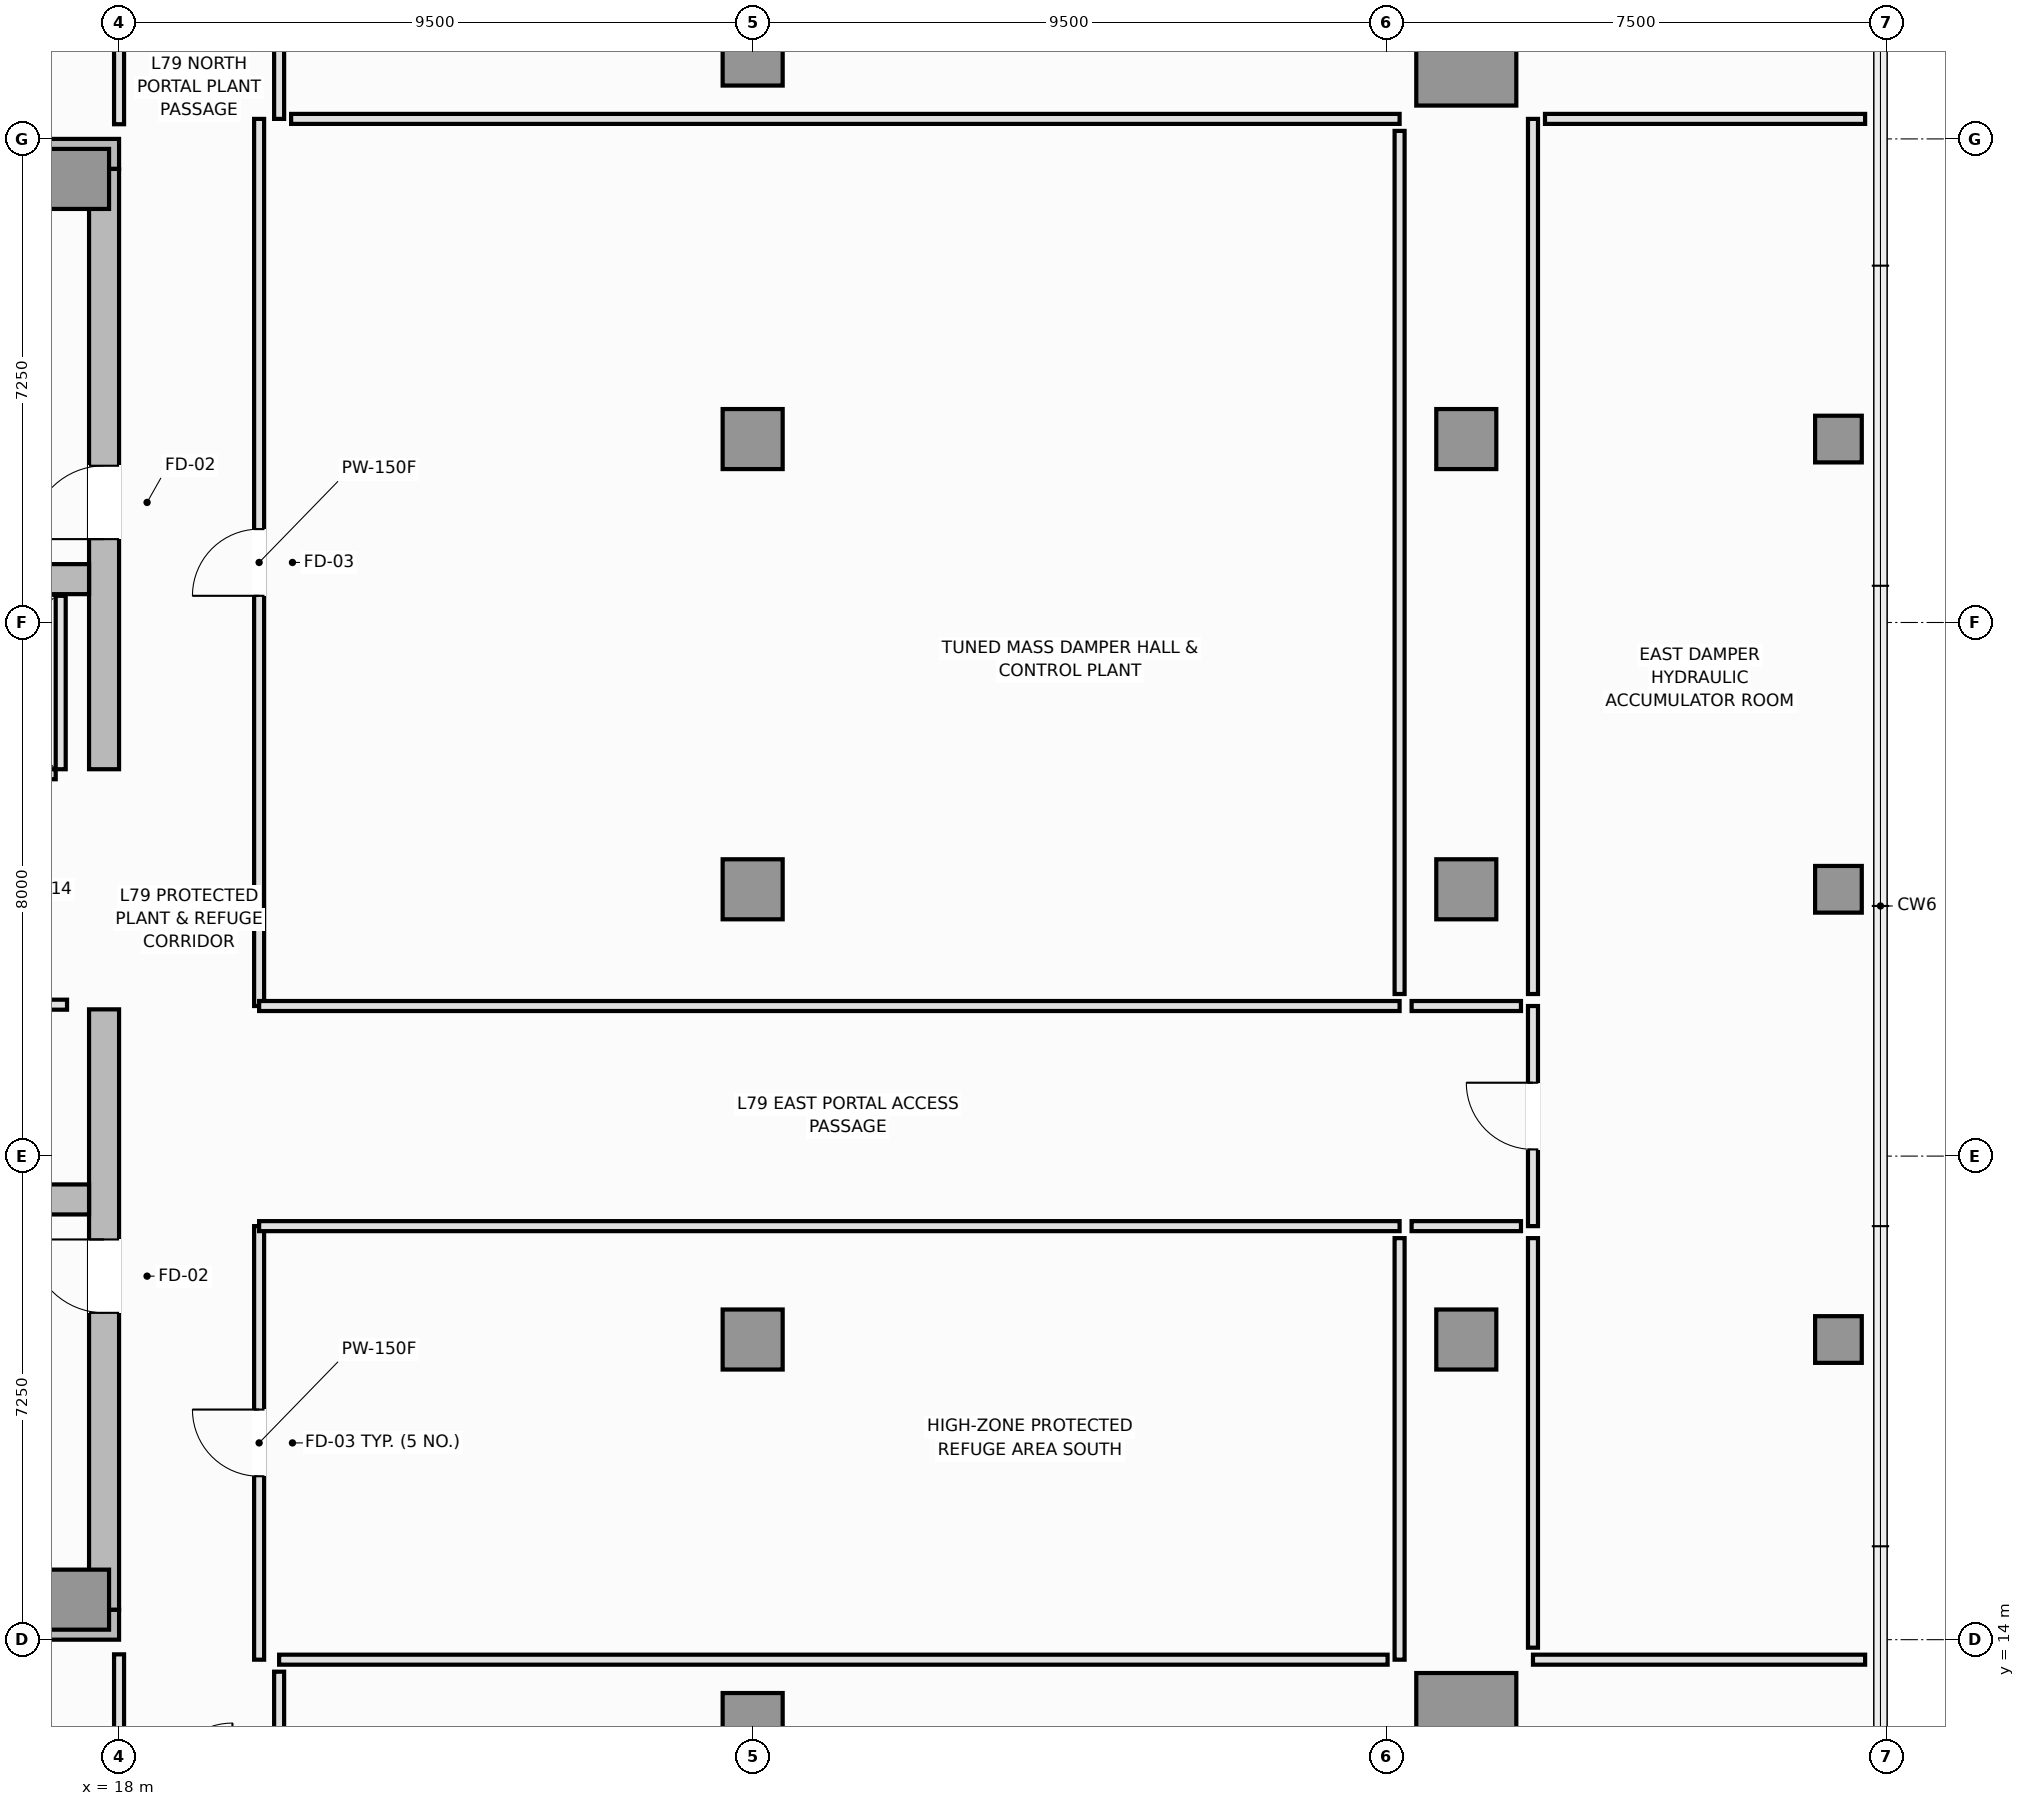
"""IFC4 building model, lengths in metres.
Left out: names, types, materials, properties, quantities, classifications, styles, units other than length and angle.
Written with IfcOpenShell. Run it as: python <this file> out.ifc"""

import sys

from ifc_helpers import new_model, si_unit, direction, frame, frame_2d, origin, origin_2d, place, context, subcontext, project, spatial, rectangle, extrude, element, fill, save


model = new_model("IFC4")
c1 = context("Model", 3, precision=1e-05, world=origin(), true_north=direction((0.0, 1.0)))
c2 = subcontext(c1, "Body", "Model", "MODEL_VIEW")
j1 = project(units=[si_unit("LENGTHUNIT", "METRE"), si_unit("PLANEANGLEUNIT", "RADIAN")], contexts=[c1])
p1 = place(None, origin())
s1 = spatial("IfcSite", under=j1, at=p1, CompositionType="ELEMENT")
p2 = place(p1, origin())
s2 = spatial("IfcBuilding", under=s1, at=p2, CompositionType="ELEMENT")
p3 = place(p2, frame((0.0, 0.0, 296.65)))
s3 = spatial("IfcBuildingStorey", under=s2, at=p3, CompositionType="ELEMENT", Elevation=296.65)
for number, where, z_axis, x_axis in (
    (1, (4.5, 14.225, 0.0), (0.0, 0.0, 1.0), (1.0, 0.0, 0.0)),
    (2, (4.5, 36.275, 0.0), (0.0, 0.0, 1.0), (1.0, 0.0, 0.0)),
):
    element("IfcWall", number, at=place(p3, frame(where, z_axis=z_axis, x_axis=x_axis)), inside=s3, PredefinedType="SHEAR", context=c2, shape_type="SweptSolid", body=[
        extrude(rectangle(XDim=13.5, YDim=0.45, at=frame_2d((6.75, 0.0))), origin(), (0.0, 0.0, 1.0), 6.4),
    ])
p4 = place(p3, frame((17.775, 14.45, 0.0), z_axis=(0.0, 0.0, 1.0), x_axis=(0.0, 1.0, 0.0)))
e3 = element("IfcWall", 3, at=p4, inside=s3, PredefinedType="SHEAR", context=c2, shape_type="SweptSolid", body=[
    extrude(rectangle(XDim=9.0, YDim=0.45, at=frame_2d((4.5, 0.0))), origin(), (0.0, 0.0, 1.0), 6.4),
])
p5 = place(p4, frame((4.45, 0.0, 0.0)))
e4 = element("IfcOpeningElement", 4, at=p5, cuts=e3, PredefinedType="OPENING", context=c2, shape_type="SweptSolid", body=[
    extrude(rectangle(XDim=1.1, YDim=2.15, at=frame_2d((0.55, 1.075))), frame((0.0, 0.235, 0.0), z_axis=(0.0, -1.0, 0.0), x_axis=(1.0, 0.0, 0.0)), (0.0, 0.0, 1.0), 0.47),
])
p6 = place(p3, frame((17.775, 27.05, 0.0), z_axis=(0.0, 0.0, 1.0), x_axis=(0.0, 1.0, 0.0)))
e5 = element("IfcWall", 5, at=p6, inside=s3, PredefinedType="SHEAR", context=c2, shape_type="SweptSolid", body=[
    extrude(rectangle(XDim=9.0, YDim=0.45, at=frame_2d((4.5, 0.0))), origin(), (0.0, 0.0, 1.0), 6.4),
])
p7 = place(p6, frame((3.45, 0.0, 0.0)))
e6 = element("IfcOpeningElement", 6, at=p7, cuts=e5, PredefinedType="OPENING", context=c2, shape_type="SweptSolid", body=[
    extrude(rectangle(XDim=1.1, YDim=2.15, at=frame_2d((0.55, 1.075))), frame((0.0, 0.235, 0.0), z_axis=(0.0, -1.0, 0.0), x_axis=(1.0, 0.0, 0.0)), (0.0, 0.0, 1.0), 0.47),
])
for number, where, z_axis, x_axis in (
    (7, (4.95, 20.6, 0.0), (0.0, 0.0, 1.0), (1.0, 0.0, 0.0)),
    (8, (4.95, 29.9, 0.0), (0.0, 0.0, 1.0), (1.0, 0.0, 0.0)),
):
    element("IfcWall", number, at=place(p3, frame(where, z_axis=z_axis, x_axis=x_axis)), inside=s3, PredefinedType="SHEAR", context=c2, shape_type="SweptSolid", body=[
        extrude(rectangle(XDim=12.6, YDim=0.45, at=frame_2d((6.3, 0.0))), origin(), (0.0, 0.0, 1.0), 6.4),
    ])
for number, where, z_axis, x_axis in (
    (9, (17.4, 14.6, 0.0), (0.0, 0.0, 1.0), (1.0, 0.0, 0.0)),
    (10, (17.4, 35.9, 0.0), (0.0, 0.0, 1.0), (1.0, 0.0, 0.0)),
):
    element("IfcColumn", number, at=place(p3, frame(where, z_axis=z_axis, x_axis=x_axis)), inside=s3, PredefinedType="PILASTER", context=c2, shape_type="SweptSolid", body=[
        extrude(rectangle(XDim=0.9, YDim=0.9, at=origin_2d()), origin(), (0.0, 0.0, 1.0), 6.4),
    ])
for number, where, z_axis, x_axis in (
    (11, (38.2, 12.75, 0.0), (0.0, 0.0, 1.0), (1.0, 0.0, 0.0)),
    (12, (38.2, 37.75, 0.0), (0.0, 0.0, 1.0), (1.0, 0.0, 0.0)),
):
    element("IfcColumn", number, at=place(p3, frame(where, z_axis=z_axis, x_axis=x_axis)), inside=s3, PredefinedType="COLUMN", context=c2, shape_type="SweptSolid", body=[
        extrude(rectangle(XDim=1.5, YDim=1.5, at=origin_2d()), origin(), (0.0, 0.0, 1.0), 6.4),
    ])
for number, where, z_axis, x_axis in (
    (13, (27.5, 12.75, 0.0), (0.0, 0.0, 1.0), (1.0, 0.0, 0.0)),
    (14, (27.5, 37.75, 0.0), (0.0, 0.0, 1.0), (1.0, 0.0, 0.0)),
    (15, (38.2, 18.5, 0.0), (0.0, 0.0, 1.0), (1.0, 0.0, 0.0)),
    (16, (38.2, 25.25, 0.0), (0.0, 0.0, 1.0), (1.0, 0.0, 0.0)),
    (17, (38.2, 32.0, 0.0), (0.0, 0.0, 1.0), (1.0, 0.0, 0.0)),
):
    element("IfcColumn", number, at=place(p3, frame(where, z_axis=z_axis, x_axis=x_axis)), inside=s3, PredefinedType="COLUMN", context=c2, shape_type="SweptSolid", body=[
        extrude(rectangle(XDim=0.9, YDim=0.9, at=origin_2d()), origin(), (0.0, 0.0, 1.0), 6.4),
    ])
for number, where, z_axis, x_axis in (
    (18, (43.78, 18.5, 0.0), (0.0, 0.0, 1.0), (1.0, 0.0, 0.0)),
    (19, (43.78, 25.25, 0.0), (0.0, 0.0, 1.0), (1.0, 0.0, 0.0)),
    (20, (43.78, 32.0, 0.0), (0.0, 0.0, 1.0), (1.0, 0.0, 0.0)),
):
    element("IfcColumn", number, at=place(p3, frame(where, z_axis=z_axis, x_axis=x_axis)), inside=s3, PredefinedType="COLUMN", context=c2, shape_type="SweptSolid", body=[
        extrude(rectangle(XDim=0.7, YDim=0.7, at=origin_2d()), origin(), (0.0, 0.0, 1.0), 6.4),
    ])
for number, where, z_axis, x_axis in (
    (21, (27.5, 18.5, 0.0), (0.0, 0.0, 1.0), (1.0, 0.0, 0.0)),
    (22, (27.5, 25.25, 0.0), (0.0, 0.0, 1.0), (1.0, 0.0, 0.0)),
    (23, (27.5, 32.0, 0.0), (0.0, 0.0, 1.0), (1.0, 0.0, 0.0)),
):
    element("IfcColumn", number, at=place(p3, frame(where, z_axis=z_axis, x_axis=x_axis)), inside=s3, PredefinedType="COLUMN", context=c2, shape_type="SweptSolid", body=[
        extrude(rectangle(XDim=0.9, YDim=0.9, at=origin_2d()), origin(), (0.0, 0.0, 1.0), 6.4),
    ])
p8 = place(p3, frame((14.5, 26.975, 0.0), z_axis=(0.0, 0.0, 1.0), x_axis=(1.0, 0.0, 0.0)))
e24 = element("IfcWall", 24, at=p8, inside=s3, PredefinedType="PARTITIONING", context=c2, shape_type="SweptSolid", body=[
    extrude(rectangle(XDim=2.55, YDim=0.15, at=frame_2d((1.275, 0.0))), origin(), (0.0, 0.0, 1.0), 6.2),
])
p9 = place(p8, frame((0.625, 0.0, 0.0)))
e25 = element("IfcOpeningElement", 25, at=p9, cuts=e24, PredefinedType="OPENING", context=c2, shape_type="SweptSolid", body=[
    extrude(rectangle(XDim=1.3, YDim=2.2, at=frame_2d((0.65, 1.1))), frame((0.0, 0.085, 0.0), z_axis=(0.0, -1.0, 0.0), x_axis=(1.0, 0.0, 0.0)), (0.0, 0.0, 1.0), 0.17),
])
p10 = place(p3, frame((17.125, 27.05, 0.0), z_axis=(0.0, 0.0, 1.0), x_axis=(0.0, 1.0, 0.0)))
e26 = element("IfcWall", 26, at=p10, inside=s3, PredefinedType="PARTITIONING", context=c2, shape_type="SweptSolid", body=[
    extrude(rectangle(XDim=2.6, YDim=0.15, at=frame_2d((1.3, 0.0))), origin(), (0.0, 0.0, 1.0), 6.2),
])
p11 = place(p3, frame((16.05, 23.52, 0.0), z_axis=(0.0, 0.0, 1.0), x_axis=(1.0, 0.0, 0.0)))
e27 = element("IfcWall", 27, at=p11, inside=s3, PredefinedType="PARTITIONING", context=c2, shape_type="SweptSolid", body=[
    extrude(rectangle(XDim=1.17, YDim=0.15, at=frame_2d((0.585, 0.0))), origin(), (0.0, 0.0, 1.0), 6.2),
])
p12 = place(p3, frame((20.1, 13.7, 0.0), z_axis=(0.0, 0.0, 1.0), x_axis=(0.0, 1.0, 0.0)))
e28 = element("IfcWall", 28, at=p12, inside=s3, PredefinedType="PARTITIONING", context=c2, shape_type="SweptSolid", body=[
    extrude(rectangle(XDim=6.5, YDim=0.15, at=frame_2d((3.25, 0.0))), origin(), (0.0, 0.0, 1.0), 6.2),
])
p13 = place(p12, frame((2.75, 0.0, 0.0)))
e29 = element("IfcOpeningElement", 29, at=p13, cuts=e28, PredefinedType="OPENING", context=c2, shape_type="SweptSolid", body=[
    extrude(rectangle(XDim=1.0, YDim=2.15, at=frame_2d((0.5, 1.075))), frame((0.0, 0.085, 0.0), z_axis=(0.0, -1.0, 0.0), x_axis=(1.0, 0.0, 0.0)), (0.0, 0.0, 1.0), 0.17),
])
p14 = place(p3, frame((20.1, 23.5, 0.0), z_axis=(0.0, 0.0, 1.0), x_axis=(0.0, 1.0, 0.0)))
e30 = element("IfcWall", 30, at=p14, inside=s3, PredefinedType="PARTITIONING", context=c2, shape_type="SweptSolid", body=[
    extrude(rectangle(XDim=13.3, YDim=0.15, at=frame_2d((6.65, 0.0))), origin(), (0.0, 0.0, 1.0), 6.2),
])
p15 = place(p14, frame((6.15, 0.0, 0.0)))
e31 = element("IfcOpeningElement", 31, at=p15, cuts=e30, PredefinedType="OPENING", context=c2, shape_type="SweptSolid", body=[
    extrude(rectangle(XDim=1.0, YDim=2.15, at=frame_2d((0.5, 1.075))), frame((0.0, 0.085, 0.0), z_axis=(0.0, -1.0, 0.0), x_axis=(1.0, 0.0, 0.0)), (0.0, 0.0, 1.0), 0.17),
])
for number, where, z_axis, x_axis in (
    (32, (20.1, 20.2, 0.0), (0.0, 0.0, 1.0), (1.0, 0.0, 0.0)),
    (33, (20.1, 23.5, 0.0), (0.0, 0.0, 1.0), (1.0, 0.0, 0.0)),
):
    element("IfcWall", number, at=place(p3, frame(where, z_axis=z_axis, x_axis=x_axis)), inside=s3, PredefinedType="PARTITIONING", context=c2, shape_type="SweptSolid", body=[
        extrude(rectangle(XDim=17.1, YDim=0.15, at=frame_2d((8.55, 0.0))), origin(), (0.0, 0.0, 1.0), 6.2),
    ])
p16 = place(p3, frame((39.2, 20.2, 0.0), z_axis=(0.0, 0.0, 1.0), x_axis=(0.0, 1.0, 0.0)))
e34 = element("IfcWall", 34, at=p16, inside=s3, PredefinedType="PARTITIONING", context=c2, shape_type="SweptSolid", body=[
    extrude(rectangle(XDim=3.3, YDim=0.15, at=frame_2d((1.65, 0.0))), origin(), (0.0, 0.0, 1.0), 6.2),
])
p17 = place(p16, frame((1.15, 0.0, 0.0)))
e35 = element("IfcOpeningElement", 35, at=p17, cuts=e34, PredefinedType="OPENING", context=c2, shape_type="SweptSolid", body=[
    extrude(rectangle(XDim=1.0, YDim=2.15, at=frame_2d((0.5, 1.075))), frame((0.0, 0.085, 0.0), z_axis=(0.0, -1.0, 0.0), x_axis=(1.0, 0.0, 0.0)), (0.0, 0.0, 1.0), 0.17),
])
p18 = place(p3, frame((20.4, 38.57, 0.0), z_axis=(0.0, 0.0, 1.0), x_axis=(0.0, -1.0, 0.0)))
e36 = element("IfcWall", 36, at=p18, inside=s3, PredefinedType="PARTITIONING", context=c2, shape_type="SweptSolid", body=[
    extrude(rectangle(XDim=1.77, YDim=0.15, at=frame_2d((0.885, 0.0))), origin(), (0.0, 0.0, 1.0), 6.2),
])
p19 = place(p3, frame((20.58, 36.8, 0.0), z_axis=(0.0, 0.0, 1.0), x_axis=(1.0, 0.0, 0.0)))
e37 = element("IfcWall", 37, at=p19, inside=s3, PredefinedType="PARTITIONING", context=c2, shape_type="SweptSolid", body=[
    extrude(rectangle(XDim=16.62, YDim=0.15, at=frame_2d((8.31, 0.0))), origin(), (0.0, 0.0, 1.0), 6.2),
])
p20 = place(p3, frame((37.2, 36.62, 0.0), z_axis=(0.0, 0.0, 1.0), x_axis=(0.0, -1.0, 0.0)))
e38 = element("IfcWall", 38, at=p20, inside=s3, PredefinedType="PARTITIONING", context=c2, shape_type="SweptSolid", body=[
    extrude(rectangle(XDim=12.94, YDim=0.15, at=frame_2d((6.47, 0.0))), origin(), (0.0, 0.0, 1.0), 6.2),
])
p21 = place(p3, frame((37.38, 23.5, 0.0), z_axis=(0.0, 0.0, 1.0), x_axis=(1.0, 0.0, 0.0)))
e39 = element("IfcWall", 39, at=p21, inside=s3, PredefinedType="PARTITIONING", context=c2, shape_type="SweptSolid", body=[
    extrude(rectangle(XDim=1.64, YDim=0.15, at=frame_2d((0.82, 0.0))), origin(), (0.0, 0.0, 1.0), 6.2),
])
p22 = place(p3, frame((39.2, 23.68, 0.0), z_axis=(0.0, 0.0, 1.0), x_axis=(0.0, 1.0, 0.0)))
e40 = element("IfcWall", 40, at=p22, inside=s3, PredefinedType="PARTITIONING", context=c2, shape_type="SweptSolid", body=[
    extrude(rectangle(XDim=13.12, YDim=0.15, at=frame_2d((6.56, 0.0))), origin(), (0.0, 0.0, 1.0), 6.2),
])
p23 = place(p3, frame((39.38, 36.8, 0.0), z_axis=(0.0, 0.0, 1.0), x_axis=(1.0, 0.0, 0.0)))
e41 = element("IfcWall", 41, at=p23, inside=s3, PredefinedType="PARTITIONING", context=c2, shape_type="SweptSolid", body=[
    extrude(rectangle(XDim=4.8, YDim=0.15, at=frame_2d((2.4, 0.0))), origin(), (0.0, 0.0, 1.0), 6.2),
])
p24 = place(p3, frame((44.18, 13.7, 0.0), z_axis=(0.0, 0.0, 1.0), x_axis=(-1.0, 0.0, 0.0)))
e42 = element("IfcWall", 42, at=p24, inside=s3, PredefinedType="PARTITIONING", context=c2, shape_type="SweptSolid", body=[
    extrude(rectangle(XDim=4.98, YDim=0.15, at=frame_2d((2.49, 0.0))), origin(), (0.0, 0.0, 1.0), 6.2),
])
p25 = place(p3, frame((39.2, 13.88, 0.0), z_axis=(0.0, 0.0, 1.0), x_axis=(0.0, 1.0, 0.0)))
e43 = element("IfcWall", 43, at=p25, inside=s3, PredefinedType="PARTITIONING", context=c2, shape_type="SweptSolid", body=[
    extrude(rectangle(XDim=6.14, YDim=0.15, at=frame_2d((3.07, 0.0))), origin(), (0.0, 0.0, 1.0), 6.2),
])
p26 = place(p3, frame((39.02, 20.2, 0.0), z_axis=(0.0, 0.0, 1.0), x_axis=(-1.0, 0.0, 0.0)))
e44 = element("IfcWall", 44, at=p26, inside=s3, PredefinedType="PARTITIONING", context=c2, shape_type="SweptSolid", body=[
    extrude(rectangle(XDim=1.64, YDim=0.15, at=frame_2d((0.82, 0.0))), origin(), (0.0, 0.0, 1.0), 6.2),
])
p27 = place(p3, frame((37.2, 20.02, 0.0), z_axis=(0.0, 0.0, 1.0), x_axis=(0.0, -1.0, 0.0)))
e45 = element("IfcWall", 45, at=p27, inside=s3, PredefinedType="PARTITIONING", context=c2, shape_type="SweptSolid", body=[
    extrude(rectangle(XDim=6.32, YDim=0.15, at=frame_2d((3.16, 0.0))), origin(), (0.0, 0.0, 1.0), 6.2),
])
p28 = place(p3, frame((37.02, 13.7, 0.0), z_axis=(0.0, 0.0, 1.0), x_axis=(-1.0, 0.0, 0.0)))
e46 = element("IfcWall", 46, at=p28, inside=s3, PredefinedType="PARTITIONING", context=c2, shape_type="SweptSolid", body=[
    extrude(rectangle(XDim=16.62, YDim=0.15, at=frame_2d((8.31, 0.0))), origin(), (0.0, 0.0, 1.0), 6.2),
])
p29 = place(p3, frame((20.4, 13.52, 0.0), z_axis=(0.0, 0.0, 1.0), x_axis=(0.0, -1.0, 0.0)))
e47 = element("IfcWall", 47, at=p29, inside=s3, PredefinedType="PARTITIONING", context=c2, shape_type="SweptSolid", body=[
    extrude(rectangle(XDim=1.59, YDim=0.15, at=frame_2d((0.795, 0.0))), origin(), (0.0, 0.0, 1.0), 6.2),
])
for number, where, z_axis, x_axis in (
    (48, (18.0, 11.93, 0.0), (0.0, 0.0, 1.0), (0.0, 1.0, 0.0)),
    (49, (18.0, 36.72, 0.0), (0.0, 0.0, 1.0), (0.0, 1.0, 0.0)),
):
    element("IfcWall", number, at=place(p3, frame(where, z_axis=z_axis, x_axis=x_axis)), inside=s3, PredefinedType="PARTITIONING", context=c2, shape_type="SweptSolid", body=[
        extrude(rectangle(XDim=1.85, YDim=0.15, at=frame_2d((0.925, 0.0))), origin(), (0.0, 0.0, 1.0), 6.2),
    ])
p30 = place(p5, origin())
e50 = element("IfcDoor", 50, at=p30, inside=s3, OperationType="SINGLE_SWING_RIGHT", PredefinedType="DOOR", context=c2, shape_type="SweptSolid", body=[
    extrude(rectangle(XDim=1.1, YDim=2.15, at=frame_2d((0.55, 1.075))), frame((0.0, 0.025, 0.0), z_axis=(0.0, -1.0, 0.0), x_axis=(1.0, 0.0, 0.0)), (0.0, 0.0, 1.0), 0.05),
])
fill(e4, e50)
p31 = place(p7, origin())
e51 = element("IfcDoor", 51, at=p31, inside=s3, OperationType="SINGLE_SWING_LEFT", PredefinedType="DOOR", context=c2, shape_type="SweptSolid", body=[
    extrude(rectangle(XDim=1.1, YDim=2.15, at=frame_2d((0.55, 1.075))), frame((0.0, 0.025, 0.0), z_axis=(0.0, -1.0, 0.0), x_axis=(1.0, 0.0, 0.0)), (0.0, 0.0, 1.0), 0.05),
])
fill(e6, e51)
p32 = place(p13, origin())
e52 = element("IfcDoor", 52, at=p32, inside=s3, OperationType="SINGLE_SWING_RIGHT", PredefinedType="DOOR", context=c2, shape_type="SweptSolid", body=[
    extrude(rectangle(XDim=1.0, YDim=2.15, at=frame_2d((0.5, 1.075))), frame((0.0, 0.025, 0.0), z_axis=(0.0, -1.0, 0.0), x_axis=(1.0, 0.0, 0.0)), (0.0, 0.0, 1.0), 0.05),
])
fill(e29, e52)
p33 = place(p15, origin())
e53 = element("IfcDoor", 53, at=p33, inside=s3, OperationType="SINGLE_SWING_LEFT", PredefinedType="DOOR", context=c2, shape_type="SweptSolid", body=[
    extrude(rectangle(XDim=1.0, YDim=2.15, at=frame_2d((0.5, 1.075))), frame((0.0, 0.025, 0.0), z_axis=(0.0, -1.0, 0.0), x_axis=(1.0, 0.0, 0.0)), (0.0, 0.0, 1.0), 0.05),
])
fill(e31, e53)
p34 = place(p17, origin())
e54 = element("IfcDoor", 54, at=p34, inside=s3, OperationType="SINGLE_SWING_RIGHT", PredefinedType="DOOR", context=c2, shape_type="SweptSolid", body=[
    extrude(rectangle(XDim=1.0, YDim=2.15, at=frame_2d((0.5, 1.075))), frame((0.0, 0.025, 0.0), z_axis=(0.0, -1.0, 0.0), x_axis=(1.0, 0.0, 0.0)), (0.0, 0.0, 1.0), 0.05),
])
fill(e35, e54)
save(model, sys.argv[1])
